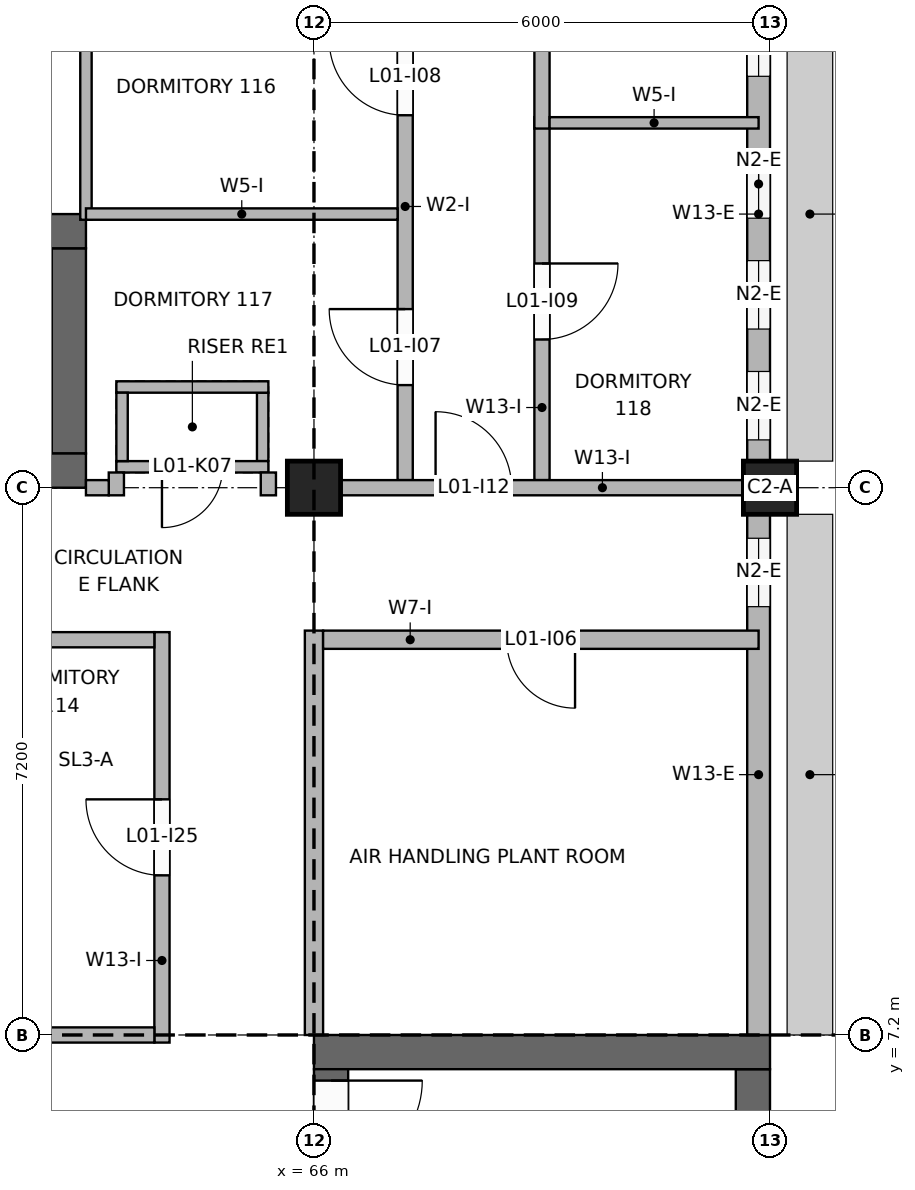
"""IFC4 building model, lengths in metres.
Left out: names, types, materials, properties, quantities, classifications, styles, units other than length and angle.
Written with IfcOpenShell. Run it as: python <this file> out.ifc"""

import sys

from ifc_helpers import new_model, si_unit, direction, frame, frame_2d, origin, origin_2d, place, context, subcontext, project, spatial, rectangle, extrude, element, fill, save


model = new_model("IFC4")
c1 = context("Model", 3, precision=1e-05, world=origin(), true_north=direction((0.0, 1.0)))
c2 = subcontext(c1, "Body", "Model", "MODEL_VIEW")
j1 = project(units=[si_unit("LENGTHUNIT", "METRE"), si_unit("PLANEANGLEUNIT", "RADIAN")], contexts=[c1])
p1 = place(None, origin())
s1 = spatial("IfcSite", under=j1, at=p1, CompositionType="ELEMENT")
p2 = place(p1, origin())
s2 = spatial("IfcBuilding", under=s1, at=p2, CompositionType="ELEMENT")
p3 = place(p2, frame((0.0, 0.0, 4.2)))
s3 = spatial("IfcBuildingStorey", under=s2, at=p3, CompositionType="ELEMENT", Elevation=4.2)
p4 = place(p3, frame((60.0, 14.625, 0.0), z_axis=(0.0, 0.0, 1.0), x_axis=(1.0, 0.0, 0.0)))
e1 = element("IfcWall", 1, at=p4, inside=s3, PredefinedType="SHEAR", context=c2, shape_type="SweptSolid", body=[
    extrude(rectangle(XDim=3.0, YDim=0.45, at=frame_2d((1.5, 0.0))), origin(), (0.0, 0.0, 1.0), 4.2),
])
p5 = place(p4, frame((0.95, 0.0, 0.0)))
e2 = element("IfcOpeningElement", 2, at=p5, cuts=e1, PredefinedType="OPENING", context=c2, shape_type="SweptSolid", body=[
    extrude(rectangle(XDim=1.1, YDim=2.1, at=frame_2d((0.55, 1.05))), frame((0.0, 0.235, 0.0), z_axis=(0.0, -1.0, 0.0), x_axis=(1.0, 0.0, 0.0)), (0.0, 0.0, 1.0), 0.47),
])
p6 = place(p3, frame((60.0, 17.775, 0.0), z_axis=(0.0, 0.0, 1.0), x_axis=(1.0, 0.0, 0.0)))
e3 = element("IfcWall", 3, at=p6, inside=s3, PredefinedType="SHEAR", context=c2, shape_type="SweptSolid", body=[
    extrude(rectangle(XDim=3.0, YDim=0.45, at=frame_2d((1.5, 0.0))), origin(), (0.0, 0.0, 1.0), 4.2),
])
p7 = place(p3, frame((62.775, 14.85, 0.0), z_axis=(0.0, 0.0, 1.0), x_axis=(0.0, 1.0, 0.0)))
e4 = element("IfcWall", 4, at=p7, inside=s3, PredefinedType="SHEAR", context=c2, shape_type="SweptSolid", body=[
    extrude(rectangle(XDim=2.7, YDim=0.45, at=frame_2d((1.35, 0.0))), origin(), (0.0, 0.0, 1.0), 4.2),
])
p8 = place(p3, frame((66.0, 6.975, 0.0), z_axis=(0.0, 0.0, 1.0), x_axis=(1.0, 0.0, 0.0)))
e5 = element("IfcWall", 5, at=p8, inside=s3, PredefinedType="SHEAR", context=c2, shape_type="SweptSolid", body=[
    extrude(rectangle(XDim=6.0, YDim=0.45, at=frame_2d((3.0, 0.0))), origin(), (0.0, 0.0, 1.0), 3.95),
])
p9 = place(p3, frame((66.225, 0.45, 0.0), z_axis=(0.0, 0.0, 1.0), x_axis=(0.0, 1.0, 0.0)))
e6 = element("IfcWall", 6, at=p9, inside=s3, PredefinedType="SHEAR", context=c2, shape_type="SweptSolid", body=[
    extrude(rectangle(XDim=6.3, YDim=0.45, at=frame_2d((3.15, 0.0))), origin(), (0.0, 0.0, 1.0), 3.95),
])
p10 = place(p9, frame((4.95, 0.0, 0.0)))
e7 = element("IfcOpeningElement", 7, at=p10, cuts=e6, PredefinedType="OPENING", context=c2, shape_type="SweptSolid", body=[
    extrude(rectangle(XDim=1.2, YDim=2.1, at=frame_2d((0.6, 1.05))), frame((0.0, 0.235, 0.0), z_axis=(0.0, -1.0, 0.0), x_axis=(1.0, 0.0, 0.0)), (0.0, 0.0, 1.0), 0.47),
])
p11 = place(p3, frame((71.775, 0.45, 0.0), z_axis=(0.0, 0.0, 1.0), x_axis=(0.0, 1.0, 0.0)))
e8 = element("IfcWall", 8, at=p11, inside=s3, PredefinedType="SHEAR", context=c2, shape_type="SweptSolid", body=[
    extrude(rectangle(XDim=6.3, YDim=0.45, at=frame_2d((3.15, 0.0))), origin(), (0.0, 0.0, 1.0), 3.95),
])
p12 = place(p3, frame((63.4, 14.675, 0.0), z_axis=(0.0, 0.0, 1.0), x_axis=(1.0, 0.0, 0.0)))
e9 = element("IfcWall", 9, at=p12, inside=s3, PredefinedType="SOLIDWALL", context=c2, shape_type="SweptSolid", body=[
    extrude(rectangle(XDim=2.0, YDim=0.15, at=frame_2d((1.0, 0.0))), origin(), (0.0, 0.0, 1.0), 4.2),
])
p13 = place(p12, frame((0.6, 0.0, 0.0)))
e10 = element("IfcOpeningElement", 10, at=p13, cuts=e9, PredefinedType="OPENING", context=c2, shape_type="SweptSolid", body=[
    extrude(rectangle(XDim=0.8, YDim=2.1, at=frame_2d((0.4, 1.05))), frame((0.0, 0.085, 0.0), z_axis=(0.0, -1.0, 0.0), x_axis=(1.0, 0.0, 0.0)), (0.0, 0.0, 1.0), 0.17),
])
p14 = place(p3, frame((63.4, 15.725, 0.0), z_axis=(0.0, 0.0, 1.0), x_axis=(1.0, 0.0, 0.0)))
e11 = element("IfcWall", 11, at=p14, inside=s3, PredefinedType="SOLIDWALL", context=c2, shape_type="SweptSolid", body=[
    extrude(rectangle(XDim=2.0, YDim=0.15, at=frame_2d((1.0, 0.0))), origin(), (0.0, 0.0, 1.0), 4.2),
])
for number, where, z_axis, x_axis in (
    (12, (63.475, 14.75, 0.0), (0.0, 0.0, 1.0), (0.0, 1.0, 0.0)),
    (13, (65.325, 14.75, 0.0), (0.0, 0.0, 1.0), (0.0, 1.0, 0.0)),
):
    element("IfcWall", number, at=place(p3, frame(where, z_axis=z_axis, x_axis=x_axis)), inside=s3, PredefinedType="SOLIDWALL", context=c2, shape_type="SweptSolid", body=[
        extrude(rectangle(XDim=0.9, YDim=0.15, at=frame_2d((0.45, 0.0))), origin(), (0.0, 0.0, 1.0), 4.2),
    ])
for number, where, z_axis, x_axis in (
    (14, (66.0, 14.4, 0.0), (0.0, 0.0, 1.0), (1.0, 0.0, 0.0)),
    (15, (72.0, 14.4, 0.0), (0.0, 0.0, 1.0), (1.0, 0.0, 0.0)),
):
    element("IfcColumn", number, at=place(p3, frame(where, z_axis=z_axis, x_axis=x_axis)), inside=s3, PredefinedType="COLUMN", context=c2, shape_type="SweptSolid", body=[
        extrude(rectangle(XDim=0.7, YDim=0.7, at=origin_2d()), origin(), (0.0, 0.0, 1.0), 3.95),
    ])
p15 = place(p3, frame((71.85, 7.2, 0.0), z_axis=(0.0, 0.0, 1.0), x_axis=(0.0, 1.0, 0.0)))
e16 = element("IfcWall", 16, at=p15, inside=s3, PredefinedType="SOLIDWALL", context=c2, shape_type="SweptSolid", body=[
    extrude(rectangle(XDim=6.85, YDim=0.3, at=frame_2d((3.425, 0.0))), origin(), (0.0, 0.0, 1.0), 3.05),
])
p16 = place(p15, frame((5.635, 0.0, 0.9)))
e17 = element("IfcOpeningElement", 17, at=p16, cuts=e16, PredefinedType="OPENING", context=c2, shape_type="SweptSolid", body=[
    extrude(rectangle(XDim=0.9, YDim=1.2, at=frame_2d((0.45, 0.6))), frame((0.0, 0.16, 0.0), z_axis=(0.0, -1.0, 0.0), x_axis=(1.0, 0.0, 0.0)), (0.0, 0.0, 1.0), 0.32),
])
p17 = place(p3, frame((71.85, 14.75, 0.0), z_axis=(0.0, 0.0, 1.0), x_axis=(0.0, 1.0, 0.0)))
e18 = element("IfcWall", 18, at=p17, inside=s3, PredefinedType="SOLIDWALL", context=c2, shape_type="SweptSolid", body=[
    extrude(rectangle(XDim=6.5, YDim=0.3, at=frame_2d((3.25, 0.0))), origin(), (0.0, 0.0, 1.0), 3.05),
])
p18 = place(p17, frame((0.279, 0.0, 0.9)))
e19 = element("IfcOpeningElement", 19, at=p18, cuts=e18, PredefinedType="OPENING", context=c2, shape_type="SweptSolid", body=[
    extrude(rectangle(XDim=0.9, YDim=1.2, at=frame_2d((0.45, 0.6))), frame((0.0, 0.16, 0.0), z_axis=(0.0, -1.0, 0.0), x_axis=(1.0, 0.0, 0.0)), (0.0, 0.0, 1.0), 0.32),
])
p19 = place(p17, frame((1.738, 0.0, 0.9)))
e20 = element("IfcOpeningElement", 20, at=p19, cuts=e18, PredefinedType="OPENING", context=c2, shape_type="SweptSolid", body=[
    extrude(rectangle(XDim=0.9, YDim=1.2, at=frame_2d((0.45, 0.6))), frame((0.0, 0.16, 0.0), z_axis=(0.0, -1.0, 0.0), x_axis=(1.0, 0.0, 0.0)), (0.0, 0.0, 1.0), 0.32),
])
p20 = place(p17, frame((3.196, 0.0, 0.9)))
e21 = element("IfcOpeningElement", 21, at=p20, cuts=e18, PredefinedType="OPENING", context=c2, shape_type="SweptSolid", body=[
    extrude(rectangle(XDim=0.9, YDim=1.2, at=frame_2d((0.45, 0.6))), frame((0.0, 0.16, 0.0), z_axis=(0.0, -1.0, 0.0), x_axis=(1.0, 0.0, 0.0)), (0.0, 0.0, 1.0), 0.32),
])
p21 = place(p17, frame((5.062, 0.0, 0.9)))
e22 = element("IfcOpeningElement", 22, at=p21, cuts=e18, PredefinedType="OPENING", context=c2, shape_type="SweptSolid", body=[
    extrude(rectangle(XDim=0.9, YDim=1.2, at=frame_2d((0.45, 0.6))), frame((0.0, 0.16, 0.0), z_axis=(0.0, -1.0, 0.0), x_axis=(1.0, 0.0, 0.0)), (0.0, 0.0, 1.0), 0.32),
])
p22 = place(p3, frame((63.0, 17.925, 0.0), z_axis=(0.0, 0.0, 1.0), x_axis=(0.0, 1.0, 0.0)))
e23 = element("IfcWall", 23, at=p22, inside=s3, PredefinedType="PARTITIONING", context=c2, shape_type="SweptSolid", body=[
    extrude(rectangle(XDim=3.775, YDim=0.15, at=frame_2d((1.887, 0.0))), origin(), (0.0, 0.0, 1.0), 2.55),
])
p23 = place(p3, frame((63.4, 14.3, 0.0), z_axis=(0.0, 0.0, 1.0), x_axis=(0.0, 1.0, 0.0)))
e24 = element("IfcWall", 24, at=p23, inside=s3, PredefinedType="PARTITIONING", context=c2, shape_type="SweptSolid", body=[
    extrude(rectangle(XDim=0.3, YDim=0.2, at=frame_2d((0.15, 0.0))), origin(), (0.0, 0.0, 1.0), 3.15),
])
p24 = place(p3, frame((64.0, 7.1, 0.0), z_axis=(0.0, 0.0, 1.0), x_axis=(0.0, 1.0, 0.0)))
e25 = element("IfcWall", 25, at=p24, inside=s3, PredefinedType="PARTITIONING", context=c2, shape_type="SweptSolid", body=[
    extrude(rectangle(XDim=5.4, YDim=0.2, at=frame_2d((2.7, 0.0))), origin(), (0.0, 0.0, 1.0), 3.15),
])
p25 = place(p24, frame((2.2, 0.0, 0.0)))
e26 = element("IfcOpeningElement", 26, at=p25, cuts=e25, PredefinedType="OPENING", context=c2, shape_type="SweptSolid", body=[
    extrude(rectangle(XDim=1.0, YDim=2.1, at=frame_2d((0.5, 1.05))), frame((0.0, 0.11, 0.0), z_axis=(0.0, -1.0, 0.0), x_axis=(1.0, 0.0, 0.0)), (0.0, 0.0, 1.0), 0.22),
])
p26 = place(p3, frame((65.4, 14.3, 0.0), z_axis=(0.0, 0.0, 1.0), x_axis=(0.0, 1.0, 0.0)))
e27 = element("IfcWall", 27, at=p26, inside=s3, PredefinedType="PARTITIONING", context=c2, shape_type="SweptSolid", body=[
    extrude(rectangle(XDim=0.3, YDim=0.2, at=frame_2d((0.15, 0.0))), origin(), (0.0, 0.0, 1.0), 3.15),
])
p27 = place(p3, frame((66.0, 7.2, 0.0), z_axis=(0.0, 0.0, 1.0), x_axis=(0.0, 1.0, 0.0)))
e28 = element("IfcWall", 28, at=p27, inside=s3, PredefinedType="PARTITIONING", context=c2, shape_type="SweptSolid", body=[
    extrude(rectangle(XDim=5.32, YDim=0.24, at=frame_2d((2.66, 0.0))), origin(), (0.0, 0.0, 1.0), 3.05),
])
p28 = place(p3, frame((67.2, 14.5, 0.0), z_axis=(0.0, 0.0, 1.0), x_axis=(0.0, 1.0, 0.0)))
e29 = element("IfcWall", 29, at=p28, inside=s3, PredefinedType="PARTITIONING", context=c2, shape_type="SweptSolid", body=[
    extrude(rectangle(XDim=7.2, YDim=0.2, at=frame_2d((3.6, 0.0))), origin(), (0.0, 0.0, 1.0), 2.55),
])
p29 = place(p28, frame((1.25, 0.0, 0.0)))
e30 = element("IfcOpeningElement", 30, at=p29, cuts=e29, PredefinedType="OPENING", context=c2, shape_type="SweptSolid", body=[
    extrude(rectangle(XDim=1.0, YDim=2.1, at=frame_2d((0.5, 1.05))), frame((0.0, 0.11, 0.0), z_axis=(0.0, -1.0, 0.0), x_axis=(1.0, 0.0, 0.0)), (0.0, 0.0, 1.0), 0.22),
])
p30 = place(p28, frame((4.8, 0.0, 0.0)))
e31 = element("IfcOpeningElement", 31, at=p30, cuts=e29, PredefinedType="OPENING", context=c2, shape_type="SweptSolid", body=[
    extrude(rectangle(XDim=1.0, YDim=2.1, at=frame_2d((0.5, 1.05))), frame((0.0, 0.11, 0.0), z_axis=(0.0, -1.0, 0.0), x_axis=(1.0, 0.0, 0.0)), (0.0, 0.0, 1.0), 0.22),
])
p31 = place(p3, frame((69.0, 14.5, 0.0), z_axis=(0.0, 0.0, 1.0), x_axis=(0.0, 1.0, 0.0)))
e32 = element("IfcWall", 32, at=p31, inside=s3, PredefinedType="PARTITIONING", context=c2, shape_type="SweptSolid", body=[
    extrude(rectangle(XDim=4.775, YDim=0.2, at=frame_2d((2.387, 0.0))), origin(), (0.0, 0.0, 1.0), 3.15),
])
p32 = place(p31, frame((1.85, 0.0, 0.0)))
e33 = element("IfcOpeningElement", 33, at=p32, cuts=e32, PredefinedType="OPENING", context=c2, shape_type="SweptSolid", body=[
    extrude(rectangle(XDim=1.0, YDim=2.1, at=frame_2d((0.5, 1.05))), frame((0.0, 0.11, 0.0), z_axis=(0.0, -1.0, 0.0), x_axis=(1.0, 0.0, 0.0)), (0.0, 0.0, 1.0), 0.22),
])
p33 = place(p3, frame((69.0, 19.125, 0.0), z_axis=(0.0, 0.0, 1.0), x_axis=(0.0, 1.0, 0.0)))
e34 = element("IfcWall", 34, at=p33, inside=s3, PredefinedType="PARTITIONING", context=c2, shape_type="SweptSolid", body=[
    extrude(rectangle(XDim=8.425, YDim=0.2, at=frame_2d((4.212, 0.0))), origin(), (0.0, 0.0, 1.0), 2.55),
])
p34 = place(p33, frame((1.975, 0.0, 0.0)))
e35 = element("IfcOpeningElement", 35, at=p34, cuts=e34, PredefinedType="OPENING", context=c2, shape_type="SweptSolid", body=[
    extrude(rectangle(XDim=1.0, YDim=2.1, at=frame_2d((0.5, 1.05))), frame((0.0, 0.11, 0.0), z_axis=(0.0, -1.0, 0.0), x_axis=(1.0, 0.0, 0.0)), (0.0, 0.0, 1.0), 0.22),
])
p35 = place(p33, frame((6.15, 0.0, 0.0)))
e36 = element("IfcOpeningElement", 36, at=p35, cuts=e34, PredefinedType="OPENING", context=c2, shape_type="SweptSolid", body=[
    extrude(rectangle(XDim=1.0, YDim=2.1, at=frame_2d((0.5, 1.05))), frame((0.0, 0.11, 0.0), z_axis=(0.0, -1.0, 0.0), x_axis=(1.0, 0.0, 0.0)), (0.0, 0.0, 1.0), 0.22),
])
p36 = place(p3, frame((60.35, 7.2, 0.0), z_axis=(0.0, 0.0, 1.0), x_axis=(1.0, 0.0, 0.0)))
e37 = element("IfcWall", 37, at=p36, inside=s3, PredefinedType="PARTITIONING", context=c2, shape_type="SweptSolid", body=[
    extrude(rectangle(XDim=3.55, YDim=0.2, at=frame_2d((1.775, 0.0))), origin(), (0.0, 0.0, 1.0), 3.15),
])
p37 = place(p3, frame((54.15, 12.4, 0.0), z_axis=(0.0, 0.0, 1.0), x_axis=(1.0, 0.0, 0.0)))
e38 = element("IfcWall", 38, at=p37, inside=s3, PredefinedType="PARTITIONING", context=c2, shape_type="SweptSolid", body=[
    extrude(rectangle(XDim=9.75, YDim=0.2, at=frame_2d((4.875, 0.0))), origin(), (0.0, 0.0, 1.0), 3.05),
])
p38 = place(p37, frame((5.6, 0.0, 0.0)))
e39 = element("IfcOpeningElement", 39, at=p38, cuts=e38, PredefinedType="OPENING", context=c2, shape_type="SweptSolid", body=[
    extrude(rectangle(XDim=1.0, YDim=2.1, at=frame_2d((0.5, 1.05))), frame((0.0, 0.11, 0.0), z_axis=(0.0, -1.0, 0.0), x_axis=(1.0, 0.0, 0.0)), (0.0, 0.0, 1.0), 0.22),
])
p39 = place(p3, frame((66.12, 12.4, 0.0), z_axis=(0.0, 0.0, 1.0), x_axis=(1.0, 0.0, 0.0)))
e40 = element("IfcWall", 40, at=p39, inside=s3, PredefinedType="PARTITIONING", context=c2, shape_type="SweptSolid", body=[
    extrude(rectangle(XDim=5.73, YDim=0.24, at=frame_2d((2.865, 0.0))), origin(), (0.0, 0.0, 1.0), 3.05),
])
p40 = place(p39, frame((2.415, 0.0, 0.0)))
e41 = element("IfcOpeningElement", 41, at=p40, cuts=e40, PredefinedType="OPENING", context=c2, shape_type="SweptSolid", body=[
    extrude(rectangle(XDim=0.9, YDim=2.1, at=frame_2d((0.45, 1.05))), frame((0.0, 0.13, 0.0), z_axis=(0.0, -1.0, 0.0), x_axis=(1.0, 0.0, 0.0)), (0.0, 0.0, 1.0), 0.26),
])
p41 = place(p3, frame((63.0, 14.4, 0.0), z_axis=(0.0, 0.0, 1.0), x_axis=(1.0, 0.0, 0.0)))
e42 = element("IfcWall", 42, at=p41, inside=s3, PredefinedType="PARTITIONING", context=c2, shape_type="SweptSolid", body=[
    extrude(rectangle(XDim=0.3, YDim=0.2, at=frame_2d((0.15, 0.0))), origin(), (0.0, 0.0, 1.0), 3.15),
])
p42 = place(p3, frame((66.35, 14.4, 0.0), z_axis=(0.0, 0.0, 1.0), x_axis=(1.0, 0.0, 0.0)))
e43 = element("IfcWall", 43, at=p42, inside=s3, PredefinedType="PARTITIONING", context=c2, shape_type="SweptSolid", body=[
    extrude(rectangle(XDim=5.3, YDim=0.2, at=frame_2d((2.65, 0.0))), origin(), (0.0, 0.0, 1.0), 3.15),
])
p43 = place(p42, frame((1.25, 0.0, 0.0)))
e44 = element("IfcOpeningElement", 44, at=p43, cuts=e43, PredefinedType="OPENING", context=c2, shape_type="SweptSolid", body=[
    extrude(rectangle(XDim=1.0, YDim=2.1, at=frame_2d((0.5, 1.05))), frame((0.0, 0.11, 0.0), z_axis=(0.0, -1.0, 0.0), x_axis=(1.0, 0.0, 0.0)), (0.0, 0.0, 1.0), 0.22),
])
p44 = place(p3, frame((63.0, 18.0, 0.0), z_axis=(0.0, 0.0, 1.0), x_axis=(1.0, 0.0, 0.0)))
e45 = element("IfcWall", 45, at=p44, inside=s3, PredefinedType="PARTITIONING", context=c2, shape_type="SweptSolid", body=[
    extrude(rectangle(XDim=4.1, YDim=0.15, at=frame_2d((2.05, 0.0))), origin(), (0.0, 0.0, 1.0), 3.05),
])
p45 = place(p3, frame((69.1, 19.2, 0.0), z_axis=(0.0, 0.0, 1.0), x_axis=(1.0, 0.0, 0.0)))
e46 = element("IfcWall", 46, at=p45, inside=s3, PredefinedType="PARTITIONING", context=c2, shape_type="SweptSolid", body=[
    extrude(rectangle(XDim=2.75, YDim=0.15, at=frame_2d((1.375, 0.0))), origin(), (0.0, 0.0, 1.0), 3.05),
])
p46 = place(p16, origin())
e47 = element("IfcWindow", 47, at=p46, inside=s3, PartitioningType="SINGLE_PANEL", PredefinedType="WINDOW", context=c2, shape_type="SweptSolid", body=[
    extrude(rectangle(XDim=0.9, YDim=1.2, at=frame_2d((0.45, 0.6))), frame((0.0, 0.03, 0.0), z_axis=(0.0, -1.0, 0.0), x_axis=(1.0, 0.0, 0.0)), (0.0, 0.0, 1.0), 0.06),
])
fill(e17, e47)
p47 = place(p18, origin())
e48 = element("IfcWindow", 48, at=p47, inside=s3, PartitioningType="SINGLE_PANEL", PredefinedType="WINDOW", context=c2, shape_type="SweptSolid", body=[
    extrude(rectangle(XDim=0.9, YDim=1.2, at=frame_2d((0.45, 0.6))), frame((0.0, 0.03, 0.0), z_axis=(0.0, -1.0, 0.0), x_axis=(1.0, 0.0, 0.0)), (0.0, 0.0, 1.0), 0.06),
])
fill(e19, e48)
p48 = place(p19, origin())
e49 = element("IfcWindow", 49, at=p48, inside=s3, PartitioningType="SINGLE_PANEL", PredefinedType="WINDOW", context=c2, shape_type="SweptSolid", body=[
    extrude(rectangle(XDim=0.9, YDim=1.2, at=frame_2d((0.45, 0.6))), frame((0.0, 0.03, 0.0), z_axis=(0.0, -1.0, 0.0), x_axis=(1.0, 0.0, 0.0)), (0.0, 0.0, 1.0), 0.06),
])
fill(e20, e49)
p49 = place(p20, origin())
e50 = element("IfcWindow", 50, at=p49, inside=s3, PartitioningType="SINGLE_PANEL", PredefinedType="WINDOW", context=c2, shape_type="SweptSolid", body=[
    extrude(rectangle(XDim=0.9, YDim=1.2, at=frame_2d((0.45, 0.6))), frame((0.0, 0.03, 0.0), z_axis=(0.0, -1.0, 0.0), x_axis=(1.0, 0.0, 0.0)), (0.0, 0.0, 1.0), 0.06),
])
fill(e21, e50)
p50 = place(p21, origin())
e51 = element("IfcWindow", 51, at=p50, inside=s3, PartitioningType="SINGLE_PANEL", PredefinedType="WINDOW", context=c2, shape_type="SweptSolid", body=[
    extrude(rectangle(XDim=0.9, YDim=1.2, at=frame_2d((0.45, 0.6))), frame((0.0, 0.03, 0.0), z_axis=(0.0, -1.0, 0.0), x_axis=(1.0, 0.0, 0.0)), (0.0, 0.0, 1.0), 0.06),
])
fill(e22, e51)
p51 = place(p13, frame((0.8, 0.0, 0.0), z_axis=(0.0, 0.0, 1.0), x_axis=(-1.0, 0.0, 0.0)))
e52 = element("IfcDoor", 52, at=p51, inside=s3, OperationType="SINGLE_SWING_RIGHT", PredefinedType="DOOR", context=c2, shape_type="SweptSolid", body=[
    extrude(rectangle(XDim=0.8, YDim=2.1, at=frame_2d((0.4, 1.05))), frame((0.0, 0.025, 0.0), z_axis=(0.0, -1.0, 0.0), x_axis=(1.0, 0.0, 0.0)), (0.0, 0.0, 1.0), 0.05),
])
fill(e10, e52)
p52 = place(p10, frame((1.2, 0.0, 0.0), z_axis=(0.0, 0.0, 1.0), x_axis=(-1.0, 0.0, 0.0)))
e53 = element("IfcDoor", 53, at=p52, inside=s3, OperationType="SINGLE_SWING_LEFT", PredefinedType="DOOR", context=c2, shape_type="SweptSolid", body=[
    extrude(rectangle(XDim=1.2, YDim=2.1, at=frame_2d((0.6, 1.05))), frame((0.0, 0.025, 0.0), z_axis=(0.0, -1.0, 0.0), x_axis=(1.0, 0.0, 0.0)), (0.0, 0.0, 1.0), 0.05),
])
fill(e7, e53)
p53 = place(p40, frame((0.9, 0.0, 0.0), z_axis=(0.0, 0.0, 1.0), x_axis=(-1.0, 0.0, 0.0)))
e54 = element("IfcDoor", 54, at=p53, inside=s3, OperationType="SINGLE_SWING_LEFT", PredefinedType="DOOR", context=c2, shape_type="SweptSolid", body=[
    extrude(rectangle(XDim=0.9, YDim=2.1, at=frame_2d((0.45, 1.05))), frame((0.0, 0.025, 0.0), z_axis=(0.0, -1.0, 0.0), x_axis=(1.0, 0.0, 0.0)), (0.0, 0.0, 1.0), 0.05),
])
fill(e41, e54)
p54 = place(p29, origin())
e55 = element("IfcDoor", 55, at=p54, inside=s3, OperationType="SINGLE_SWING_RIGHT", PredefinedType="DOOR", context=c2, shape_type="SweptSolid", body=[
    extrude(rectangle(XDim=1.0, YDim=2.1, at=frame_2d((0.5, 1.05))), frame((0.0, 0.025, 0.0), z_axis=(0.0, -1.0, 0.0), x_axis=(1.0, 0.0, 0.0)), (0.0, 0.0, 1.0), 0.05),
])
fill(e30, e55)
p55 = place(p30, origin())
e56 = element("IfcDoor", 56, at=p55, inside=s3, OperationType="SINGLE_SWING_RIGHT", PredefinedType="DOOR", context=c2, shape_type="SweptSolid", body=[
    extrude(rectangle(XDim=1.0, YDim=2.1, at=frame_2d((0.5, 1.05))), frame((0.0, 0.025, 0.0), z_axis=(0.0, -1.0, 0.0), x_axis=(1.0, 0.0, 0.0)), (0.0, 0.0, 1.0), 0.05),
])
fill(e31, e56)
p56 = place(p32, frame((1.0, 0.0, 0.0), z_axis=(0.0, 0.0, 1.0), x_axis=(-1.0, 0.0, 0.0)))
e57 = element("IfcDoor", 57, at=p56, inside=s3, OperationType="SINGLE_SWING_LEFT", PredefinedType="DOOR", context=c2, shape_type="SweptSolid", body=[
    extrude(rectangle(XDim=1.0, YDim=2.1, at=frame_2d((0.5, 1.05))), frame((0.0, 0.025, 0.0), z_axis=(0.0, -1.0, 0.0), x_axis=(1.0, 0.0, 0.0)), (0.0, 0.0, 1.0), 0.05),
])
fill(e33, e57)
p57 = place(p43, origin())
e58 = element("IfcDoor", 58, at=p57, inside=s3, OperationType="SINGLE_SWING_LEFT", PredefinedType="DOOR", context=c2, shape_type="SweptSolid", body=[
    extrude(rectangle(XDim=1.0, YDim=2.1, at=frame_2d((0.5, 1.05))), frame((0.0, 0.025, 0.0), z_axis=(0.0, -1.0, 0.0), x_axis=(1.0, 0.0, 0.0)), (0.0, 0.0, 1.0), 0.05),
])
fill(e44, e58)
p58 = place(p25, origin())
e59 = element("IfcDoor", 59, at=p58, inside=s3, OperationType="SINGLE_SWING_RIGHT", PredefinedType="DOOR", context=c2, shape_type="SweptSolid", body=[
    extrude(rectangle(XDim=1.0, YDim=2.1, at=frame_2d((0.5, 1.05))), frame((0.0, 0.025, 0.0), z_axis=(0.0, -1.0, 0.0), x_axis=(1.0, 0.0, 0.0)), (0.0, 0.0, 1.0), 0.05),
])
fill(e26, e59)
save(model, sys.argv[1])
